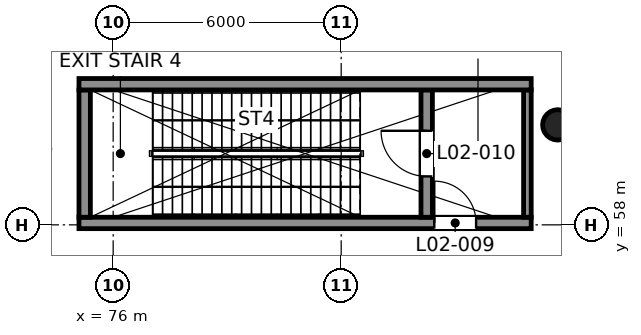
"""IFC4 building model, lengths in metres.
Left out: names, types, materials, properties, quantities, classifications, styles, units other than length and angle.
Written with IfcOpenShell. Run it as: python <this file> out.ifc"""

import sys

from ifc_helpers import new_model, si_unit, direction, frame, frame_2d, origin, origin_2d, place, context, subcontext, project, spatial, rectangle, circle, extrude, element, fill, save


model = new_model("IFC4")
c1 = context("Model", 3, precision=1e-05, world=origin(), true_north=direction((0.0, 1.0)))
c2 = subcontext(c1, "Body", "Model", "MODEL_VIEW")
j1 = project(units=[si_unit("LENGTHUNIT", "METRE"), si_unit("PLANEANGLEUNIT", "RADIAN")], contexts=[c1])
p1 = place(None, origin())
s1 = spatial("IfcSite", under=j1, at=p1, CompositionType="ELEMENT")
p2 = place(p1, origin())
s2 = spatial("IfcBuilding", under=s1, at=p2, CompositionType="ELEMENT")
p3 = place(p2, frame((0.0, 0.0, 15.0)))
s3 = spatial("IfcBuildingStorey", under=s2, at=p3, CompositionType="ELEMENT", Elevation=15.0)
p4 = place(p3, frame((87.7, 60.63, 0.0), z_axis=(0.0, 0.0, 1.0), x_axis=(1.0, 0.0, 0.0)))
e1 = element("IfcColumn", 1, at=p4, inside=s3, PredefinedType="COLUMN", context=c2, shape_type="SweptSolid", body=[
    extrude(circle(Radius=0.4, at=origin_2d()), origin(), (0.0, 0.0, 1.0), 8.0),
])
p5 = place(p3, frame((75.1, 58.05, 0.0), z_axis=(0.0, 0.0, 1.0), x_axis=(1.0, 0.0, 0.0)))
e2 = element("IfcWall", 2, at=p5, inside=s3, PredefinedType="SHEAR", context=c2, shape_type="SweptSolid", body=[
    extrude(rectangle(XDim=11.9, YDim=0.3, at=frame_2d((5.95, 0.0))), origin(), (0.0, 0.0, 1.0), 8.0),
])
p6 = place(p5, frame((9.35, 0.0, 0.0)))
e3 = element("IfcOpeningElement", 3, at=p6, cuts=e2, PredefinedType="OPENING", context=c2, shape_type="SweptSolid", body=[
    extrude(rectangle(XDim=1.1, YDim=2.1, at=frame_2d((0.55, 1.05))), frame((0.0, 0.16, 0.0), z_axis=(0.0, -1.0, 0.0), x_axis=(1.0, 0.0, 0.0)), (0.0, 0.0, 1.0), 0.32),
])
p7 = place(p3, frame((75.25, 58.2, 0.0), z_axis=(0.0, 0.0, 1.0), x_axis=(0.0, 1.0, 0.0)))
e4 = element("IfcWall", 4, at=p7, inside=s3, PredefinedType="SHEAR", context=c2, shape_type="SweptSolid", body=[
    extrude(rectangle(XDim=3.35, YDim=0.3, at=frame_2d((1.675, 0.0))), origin(), (0.0, 0.0, 1.0), 8.0),
])
p8 = place(p3, frame((84.25, 58.2, 0.0), z_axis=(0.0, 0.0, 1.0), x_axis=(0.0, 1.0, 0.0)))
e5 = element("IfcWall", 5, at=p8, inside=s3, PredefinedType="SHEAR", context=c2, shape_type="SweptSolid", body=[
    extrude(rectangle(XDim=3.35, YDim=0.3, at=frame_2d((1.675, 0.0))), origin(), (0.0, 0.0, 1.0), 8.0),
])
p9 = place(p8, frame((1.075, 0.0, 0.0)))
e6 = element("IfcOpeningElement", 6, at=p9, cuts=e5, PredefinedType="OPENING", context=c2, shape_type="SweptSolid", body=[
    extrude(rectangle(XDim=1.2, YDim=2.1, at=frame_2d((0.6, 1.05))), frame((0.0, 0.16, 0.0), z_axis=(0.0, -1.0, 0.0), x_axis=(1.0, 0.0, 0.0)), (0.0, 0.0, 1.0), 0.32),
])
p10 = place(p3, frame((86.9, 58.2, 0.0), z_axis=(0.0, 0.0, 1.0), x_axis=(0.0, 1.0, 0.0)))
e7 = element("IfcWall", 7, at=p10, inside=s3, PredefinedType="SHEAR", context=c2, shape_type="SweptSolid", body=[
    extrude(rectangle(XDim=3.35, YDim=0.2, at=frame_2d((1.675, 0.0))), origin(), (0.0, 0.0, 1.0), 8.0),
])
p11 = place(p3, frame((75.1, 61.7, 0.0), z_axis=(0.0, 0.0, 1.0), x_axis=(1.0, 0.0, 0.0)))
e8 = element("IfcWall", 8, at=p11, inside=s3, PredefinedType="SHEAR", context=c2, shape_type="SweptSolid", body=[
    extrude(rectangle(XDim=11.9, YDim=0.3, at=frame_2d((5.95, 0.0))), origin(), (0.0, 0.0, 1.0), 8.0),
])
p12 = place(p6, origin())
e9 = element("IfcDoor", 9, at=p12, inside=s3, OperationType="SINGLE_SWING_LEFT", PredefinedType="DOOR", context=c2, shape_type="SweptSolid", body=[
    extrude(rectangle(XDim=1.1, YDim=2.1, at=frame_2d((0.55, 1.05))), frame((0.0, 0.025, 0.0), z_axis=(0.0, -1.0, 0.0), x_axis=(1.0, 0.0, 0.0)), (0.0, 0.0, 1.0), 0.05),
])
fill(e3, e9)
p13 = place(p9, origin())
e10 = element("IfcDoor", 10, at=p13, inside=s3, OperationType="SINGLE_SWING_RIGHT", PredefinedType="DOOR", context=c2, shape_type="SweptSolid", body=[
    extrude(rectangle(XDim=1.2, YDim=2.1, at=frame_2d((0.6, 1.05))), frame((0.0, 0.025, 0.0), z_axis=(0.0, -1.0, 0.0), x_axis=(1.0, 0.0, 0.0)), (0.0, 0.0, 1.0), 0.05),
])
fill(e6, e10)
save(model, sys.argv[1])
